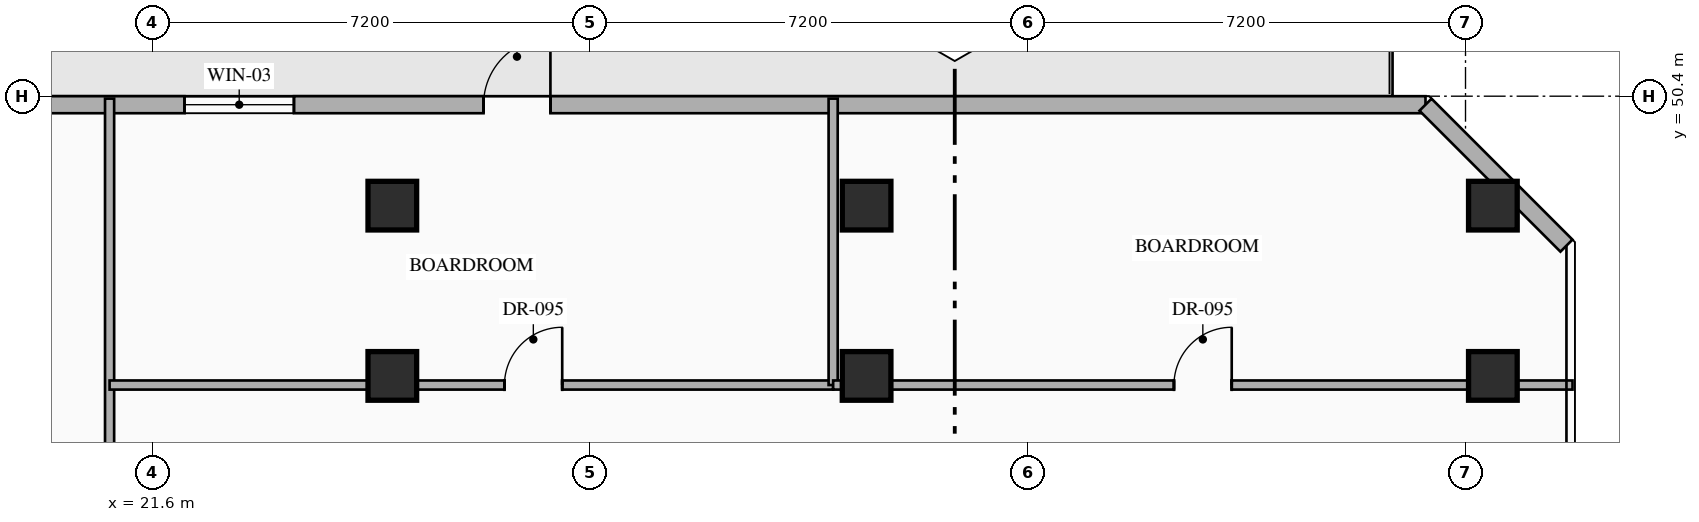
"""IFC4 building model, lengths in metres.
Left out: names, types, materials, properties, quantities, classifications, styles, units other than length and angle.
Written with IfcOpenShell. Run it as: python <this file> out.ifc"""

import sys

from ifc_helpers import new_model, si_unit, direction, frame, frame_2d, origin, origin_2d, place, context, subcontext, project, spatial, rectangle, hollow_rectangle, extrude, element, fill, save


model = new_model("IFC4")
c1 = context("Model", 3, precision=1e-05, world=origin(), true_north=direction((0.0, 1.0)))
c2 = subcontext(c1, "Body", "Model", "MODEL_VIEW")
j1 = project(units=[si_unit("LENGTHUNIT", "METRE"), si_unit("PLANEANGLEUNIT", "RADIAN")], contexts=[c1])
p1 = place(None, origin())
s1 = spatial("IfcSite", under=j1, at=p1, CompositionType="ELEMENT")
p2 = place(p1, origin())
s2 = spatial("IfcBuilding", under=s1, at=p2, CompositionType="ELEMENT")
p3 = place(p2, frame((0.0, 0.0, 174.45)))
s3 = spatial("IfcBuildingStorey", under=s2, at=p3, CompositionType="ELEMENT", Elevation=174.45)
for number, where, z_axis, x_axis in (
    (1, (25.55, 45.8, 0.0), (0.0, 0.0, 1.0), (1.0, 0.0, 0.0)),
    (2, (33.35, 45.8, 0.0), (0.0, 0.0, 1.0), (1.0, 0.0, 0.0)),
    (3, (43.65, 45.8, 0.0), (0.0, 0.0, 1.0), (1.0, 0.0, 0.0)),
    (4, (25.55, 48.6, 0.0), (0.0, 0.0, 1.0), (1.0, 0.0, 0.0)),
    (5, (33.35, 48.6, 0.0), (0.0, 0.0, 1.0), (1.0, 0.0, 0.0)),
    (6, (43.65, 48.6, 0.0), (0.0, 0.0, 1.0), (1.0, 0.0, 0.0)),
):
    element("IfcColumn", number, at=place(p3, frame(where, z_axis=z_axis, x_axis=x_axis)), inside=s3, PredefinedType="COLUMN", context=c2, shape_type="SweptSolid", body=[
        extrude(hollow_rectangle(XDim=0.8, YDim=0.8, WallThickness=0.032, at=origin_2d()), origin(), (0.0, 0.0, 1.0), 3.6),
    ])
p4 = place(p3, frame((12.058, 50.26, 0.0), z_axis=(0.0, 0.0, 1.0), x_axis=(1.0, 0.0, 0.0)))
e7 = element("IfcWall", 7, at=p4, inside=s3, PredefinedType="STANDARD", context=c2, shape_type="SweptSolid", body=[
    extrude(rectangle(XDim=30.484, YDim=0.28, at=frame_2d((15.242, 0.0))), origin(), (0.0, 0.0, 1.0), 3.35),
])
p5 = place(p4, frame((14.992, 0.0, 0.0)))
e8 = element("IfcOpeningElement", 8, at=p5, cuts=e7, PredefinedType="OPENING", context=c2, shape_type="SweptSolid", body=[
    extrude(rectangle(XDim=1.1, YDim=2.2, at=frame_2d((0.55, 1.1))), frame((0.0, 0.15, 0.0), z_axis=(0.0, -1.0, 0.0), x_axis=(1.0, 0.0, 0.0)), (0.0, 0.0, 1.0), 0.3),
])
p6 = place(p4, frame((10.074, 0.0, 0.85)))
e9 = element("IfcOpeningElement", 9, at=p6, cuts=e7, PredefinedType="OPENING", context=c2, shape_type="SweptSolid", body=[
    extrude(rectangle(XDim=1.8, YDim=2.1, at=frame_2d((0.9, 1.05))), frame((0.0, 0.15, 0.0), z_axis=(0.0, -1.0, 0.0), x_axis=(1.0, 0.0, 0.0)), (0.0, 0.0, 1.0), 0.3),
])
p7 = place(p3, frame((42.542, 50.26, 0.0), z_axis=(0.0, 0.0, 1.0), x_axis=(0.707106781187, -0.707106781187, 0.0)))
e10 = element("IfcWall", 10, at=p7, inside=s3, PredefinedType="STANDARD", context=c2, shape_type="SweptSolid", body=[
    extrude(rectangle(XDim=3.278, YDim=0.28, at=frame_2d((1.639, 0.0))), origin(), (0.0, 0.0, 1.0), 3.35),
])
p8 = place(p3, frame((20.9, 35.8, 0.0), z_axis=(0.0, 0.0, 1.0), x_axis=(0.0, 1.0, 0.0)))
e11 = element("IfcWall", 11, at=p8, inside=s3, PredefinedType="PARTITIONING", context=c2, shape_type="SweptSolid", body=[
    extrude(rectangle(XDim=14.56, YDim=0.15, at=frame_2d((7.28, 0.0))), origin(), (0.0, 0.0, 1.0), 3.35),
])
p9 = place(p8, frame((7.448, 0.0, 0.0)))
e12 = element("IfcOpeningElement", 12, at=p9, cuts=e11, PredefinedType="OPENING", context=c2, shape_type="SweptSolid", body=[
    extrude(rectangle(XDim=0.95, YDim=2.15, at=frame_2d((0.475, 1.075))), frame((0.0, 0.085, 0.0), z_axis=(0.0, -1.0, 0.0), x_axis=(1.0, 0.0, 0.0)), (0.0, 0.0, 1.0), 0.17),
])
p10 = place(p3, frame((20.9, 45.65, 0.0), z_axis=(0.0, 0.0, 1.0), x_axis=(1.0, 0.0, 0.0)))
e13 = element("IfcWall", 13, at=p10, inside=s3, PredefinedType="PARTITIONING", context=c2, shape_type="SweptSolid", body=[
    extrude(rectangle(XDim=11.9, YDim=0.15, at=frame_2d((5.95, 0.0))), origin(), (0.0, 0.0, 1.0), 2.695),
])
p11 = place(p10, frame((6.494, 0.0, 0.0)))
e14 = element("IfcOpeningElement", 14, at=p11, cuts=e13, PredefinedType="OPENING", context=c2, shape_type="SweptSolid", body=[
    extrude(rectangle(XDim=0.95, YDim=2.15, at=frame_2d((0.475, 1.075))), frame((0.0, 0.085, 0.0), z_axis=(0.0, -1.0, 0.0), x_axis=(1.0, 0.0, 0.0)), (0.0, 0.0, 1.0), 0.17),
])
p12 = place(p3, frame((32.8, 45.65, 0.0), z_axis=(0.0, 0.0, 1.0), x_axis=(0.0, 1.0, 0.0)))
e15 = element("IfcWall", 15, at=p12, inside=s3, PredefinedType="PARTITIONING", context=c2, shape_type="SweptSolid", body=[
    extrude(rectangle(XDim=4.71, YDim=0.15, at=frame_2d((2.355, 0.0))), origin(), (0.0, 0.0, 1.0), 3.35),
])
p13 = place(p3, frame((32.8, 45.65, 0.0), z_axis=(0.0, 0.0, 1.0), x_axis=(1.0, 0.0, 0.0)))
e16 = element("IfcWall", 16, at=p13, inside=s3, PredefinedType="PARTITIONING", context=c2, shape_type="SweptSolid", body=[
    extrude(rectangle(XDim=12.16, YDim=0.15, at=frame_2d((6.08, 0.0))), origin(), (0.0, 0.0, 1.0), 2.695),
])
p14 = place(p13, frame((5.605, 0.0, 0.0)))
e17 = element("IfcOpeningElement", 17, at=p14, cuts=e16, PredefinedType="OPENING", context=c2, shape_type="SweptSolid", body=[
    extrude(rectangle(XDim=0.95, YDim=2.15, at=frame_2d((0.475, 1.075))), frame((0.0, 0.085, 0.0), z_axis=(0.0, -1.0, 0.0), x_axis=(1.0, 0.0, 0.0)), (0.0, 0.0, 1.0), 0.17),
])
p15 = place(p5, origin())
e18 = element("IfcDoor", 18, at=p15, inside=s3, OperationType="SINGLE_SWING_RIGHT", PredefinedType="DOOR", context=c2, shape_type="SweptSolid", body=[
    extrude(rectangle(XDim=1.1, YDim=2.2, at=frame_2d((0.55, 1.1))), frame((0.0, 0.025, 0.0), z_axis=(0.0, -1.0, 0.0), x_axis=(1.0, 0.0, 0.0)), (0.0, 0.0, 1.0), 0.05),
])
fill(e8, e18)
p16 = place(p6, origin())
e19 = element("IfcWindow", 19, at=p16, inside=s3, PartitioningType="SINGLE_PANEL", PredefinedType="WINDOW", context=c2, shape_type="SweptSolid", body=[
    extrude(rectangle(XDim=1.8, YDim=2.1, at=frame_2d((0.9, 1.05))), frame((0.0, 0.03, 0.0), z_axis=(0.0, -1.0, 0.0), x_axis=(1.0, 0.0, 0.0)), (0.0, 0.0, 1.0), 0.06),
])
fill(e9, e19)
p17 = place(p11, origin())
e20 = element("IfcDoor", 20, at=p17, inside=s3, OperationType="SINGLE_SWING_RIGHT", PredefinedType="DOOR", context=c2, shape_type="SweptSolid", body=[
    extrude(rectangle(XDim=0.95, YDim=2.15, at=frame_2d((0.475, 1.075))), frame((0.0, 0.025, 0.0), z_axis=(0.0, -1.0, 0.0), x_axis=(1.0, 0.0, 0.0)), (0.0, 0.0, 1.0), 0.05),
])
fill(e14, e20)
p18 = place(p14, origin())
e21 = element("IfcDoor", 21, at=p18, inside=s3, OperationType="SINGLE_SWING_RIGHT", PredefinedType="DOOR", context=c2, shape_type="SweptSolid", body=[
    extrude(rectangle(XDim=0.95, YDim=2.15, at=frame_2d((0.475, 1.075))), frame((0.0, 0.025, 0.0), z_axis=(0.0, -1.0, 0.0), x_axis=(1.0, 0.0, 0.0)), (0.0, 0.0, 1.0), 0.05),
])
fill(e17, e21)
save(model, sys.argv[1])
